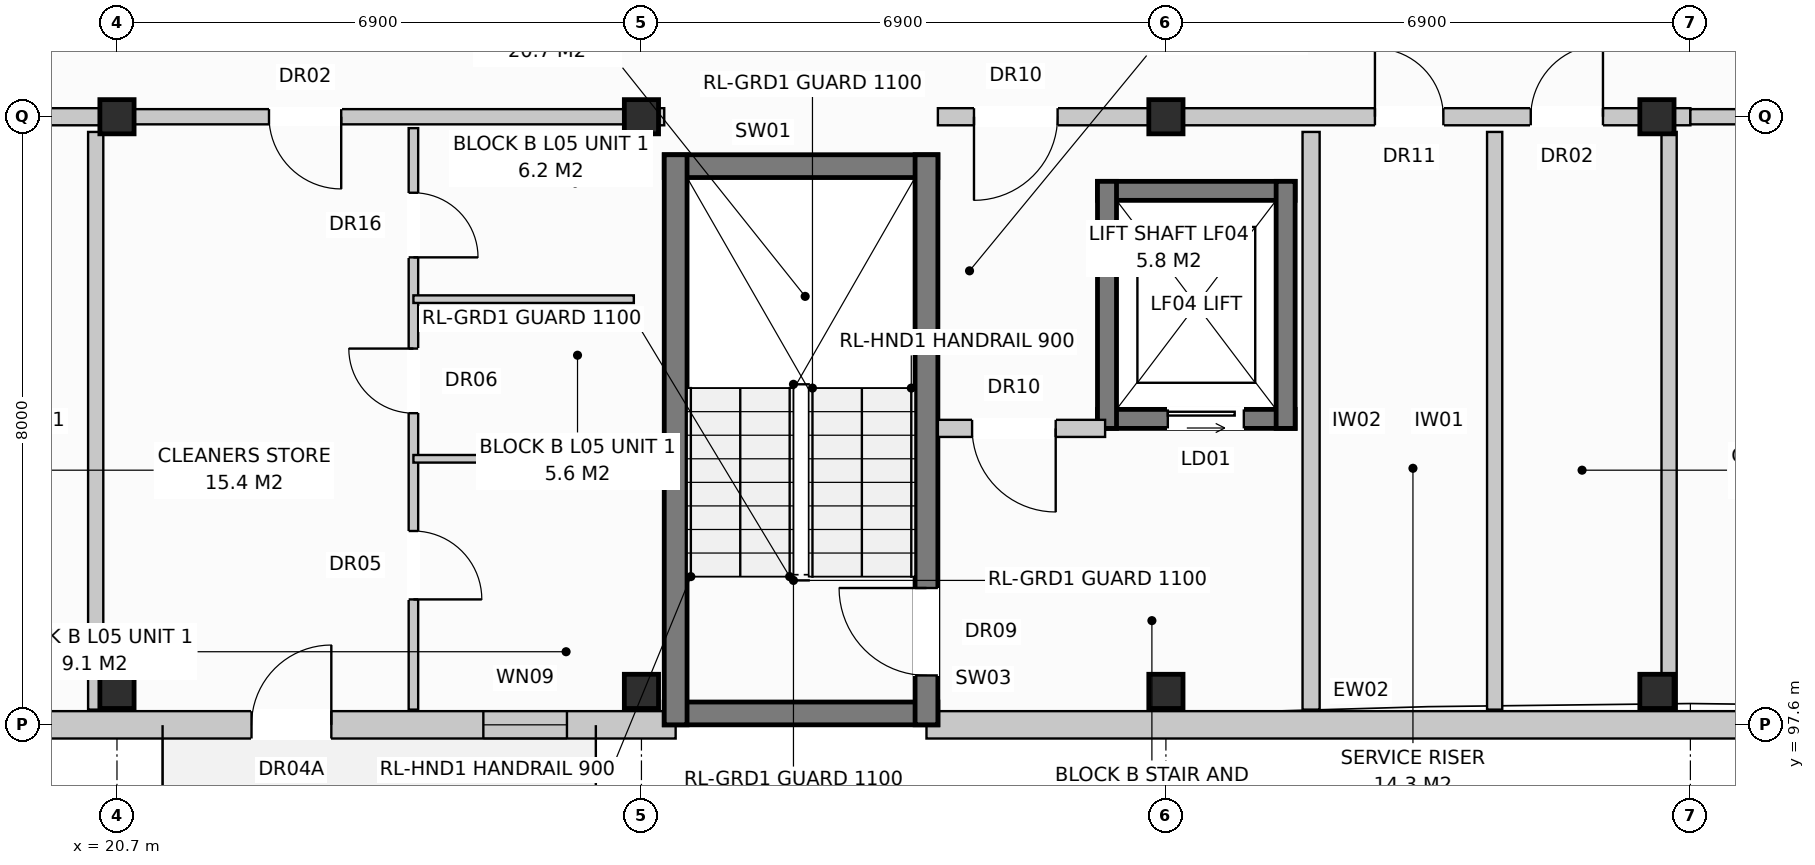
"""IFC4 building model, lengths in metres.
Left out: names, types, materials, properties, quantities, classifications, styles, units other than length and angle.
Written with IfcOpenShell. Run it as: python <this file> out.ifc"""

import sys

from ifc_helpers import new_model, si_unit, direction, frame, frame_2d, origin, origin_with_axes, origin_2d, place, context, subcontext, project, spatial, rectangle, extrude, element, fill, save


model = new_model("IFC4")
c1 = context("Model", 3, precision=1e-05, world=origin(), true_north=direction((0.0, 1.0)))
c2 = subcontext(c1, "Body", "Model", "MODEL_VIEW")
j1 = project(units=[si_unit("LENGTHUNIT", "METRE"), si_unit("PLANEANGLEUNIT", "RADIAN")], contexts=[c1])
p1 = place(None, origin())
s1 = spatial("IfcSite", under=j1, at=p1, CompositionType="ELEMENT")
p2 = place(p1, origin())
s2 = spatial("IfcBuilding", under=s1, at=p2, CompositionType="ELEMENT")
p3 = place(p2, frame((0.0, 0.0, 17.6)))
s3 = spatial("IfcBuildingStorey", under=s2, at=p3, CompositionType="ELEMENT", Elevation=17.6)
for number, where, z_axis, x_axis in (
    (1, (20.7, 98.04, 0.0), (0.0, 0.0, 1.0), (1.0, 0.0, 0.0)),
    (2, (20.7, 105.6, 0.0), (0.0, 0.0, 1.0), (1.0, 0.0, 0.0)),
    (3, (27.6, 98.04, 0.0), (0.0, 0.0, 1.0), (1.0, 0.0, 0.0)),
    (4, (27.6, 105.6, 0.0), (0.0, 0.0, 1.0), (1.0, 0.0, 0.0)),
    (5, (34.5, 98.04, 0.0), (0.0, 0.0, 1.0), (1.0, 0.0, 0.0)),
    (6, (34.5, 105.6, 0.0), (0.0, 0.0, 1.0), (1.0, 0.0, 0.0)),
    (7, (40.96, 98.04, 0.0), (0.0, 0.0, 1.0), (1.0, 0.0, 0.0)),
    (8, (40.96, 105.6, 0.0), (0.0, 0.0, 1.0), (1.0, 0.0, 0.0)),
):
    element("IfcColumn", number, at=place(p3, frame(where, z_axis=z_axis, x_axis=x_axis)), inside=s3, PredefinedType="COLUMN", context=c2, shape_type="SweptSolid", body=[
        extrude(rectangle(XDim=0.45, YDim=0.45, at=origin_2d()), origin(), (0.0, 0.0, 1.0), 3.2),
    ])
p4 = place(p3, frame((10.65, 97.6, 0.0), z_axis=(0.0, 0.0, 1.0), x_axis=(1.0, 0.0, 0.0)))
e9 = element("IfcWall", 9, at=p4, inside=s3, PredefinedType="STANDARD", context=c2, shape_type="SweptSolid", body=[
    extrude(rectangle(XDim=17.4, YDim=0.36, at=frame_2d((8.7, 0.0))), origin(), (0.0, 0.0, 1.0), 2.95),
])
p5 = place(p4, frame((11.82, 0.0, 0.0)))
e10 = element("IfcOpeningElement", 10, at=p5, cuts=e9, PredefinedType="OPENING", context=c2, shape_type="SweptSolid", body=[
    extrude(rectangle(XDim=1.05, YDim=2.12, at=frame_2d((0.525, 1.06))), frame((0.0, 0.192, 0.0), z_axis=(0.0, -1.0, 0.0), x_axis=(1.0, 0.0, 0.0)), (0.0, 0.0, 1.0), 0.384),
])
p6 = place(p4, frame((14.87, 0.0, 0.72)))
e11 = element("IfcOpeningElement", 11, at=p6, cuts=e9, PredefinedType="OPENING", context=c2, shape_type="SweptSolid", body=[
    extrude(rectangle(XDim=1.1, YDim=1.5, at=frame_2d((0.55, 0.75))), frame((0.0, 0.192, 0.0), z_axis=(0.0, -1.0, 0.0), x_axis=(1.0, 0.0, 0.0)), (0.0, 0.0, 1.0), 0.384),
])
p7 = place(p3, frame((31.35, 97.6, 0.0), z_axis=(0.0, 0.0, 1.0), x_axis=(1.0, 0.0, 0.0)))
e12 = element("IfcWall", 12, at=p7, inside=s3, PredefinedType="STANDARD", context=c2, shape_type="SweptSolid", body=[
    extrude(rectangle(XDim=23.68, YDim=0.36, at=frame_2d((11.84, 0.0))), origin(), (0.0, 0.0, 1.0), 2.95),
])
p8 = place(p7, frame((13.986, 0.0, 0.0)))
e13 = element("IfcOpeningElement", 13, at=p8, cuts=e12, PredefinedType="OPENING", context=c2, shape_type="SweptSolid", body=[
    extrude(rectangle(XDim=1.05, YDim=2.12, at=frame_2d((0.525, 1.06))), frame((0.0, 0.192, 0.0), z_axis=(0.0, -1.0, 0.0), x_axis=(1.0, 0.0, 0.0)), (0.0, 0.0, 1.0), 0.384),
])
p9 = place(p7, frame((11.745, 0.0, 0.8)))
e14 = element("IfcOpeningElement", 14, at=p9, cuts=e12, PredefinedType="OPENING", context=c2, shape_type="SweptSolid", body=[
    extrude(rectangle(XDim=1.95, YDim=1.65, at=frame_2d((0.975, 0.825))), frame((0.0, 0.192, 0.0), z_axis=(0.0, -1.0, 0.0), x_axis=(1.0, 0.0, 0.0)), (0.0, 0.0, 1.0), 0.384),
])
p10 = place(p7, frame((17.87, 0.0, 0.72)))
e15 = element("IfcOpeningElement", 15, at=p10, cuts=e12, PredefinedType="OPENING", context=c2, shape_type="SweptSolid", body=[
    extrude(rectangle(XDim=1.1, YDim=1.5, at=frame_2d((0.55, 0.75))), frame((0.0, 0.192, 0.0), z_axis=(0.0, -1.0, 0.0), x_axis=(1.0, 0.0, 0.0)), (0.0, 0.0, 1.0), 0.384),
])
p11 = place(p7, frame((20.67, 0.0, 0.8)))
e16 = element("IfcOpeningElement", 16, at=p11, cuts=e12, PredefinedType="OPENING", context=c2, shape_type="SweptSolid", body=[
    extrude(rectangle(XDim=1.9, YDim=1.85, at=frame_2d((0.95, 0.925))), frame((0.0, 0.192, 0.0), z_axis=(0.0, -1.0, 0.0), x_axis=(1.0, 0.0, 0.0)), (0.0, 0.0, 1.0), 0.384),
])
p12 = place(p3, frame((20.42, 97.8, 0.0), z_axis=(0.0, 0.0, 1.0), x_axis=(0.0, 1.0, 0.0)))
e17 = element("IfcWall", 17, at=p12, inside=s3, PredefinedType="PARTITIONING", context=c2, shape_type="SweptSolid", body=[
    extrude(rectangle(XDim=7.6, YDim=0.2, at=frame_2d((3.8, 0.0))), origin(), (0.0, 0.0, 1.0), 2.95),
])
p13 = place(p3, frame((10.8, 105.6, 0.0), z_axis=(0.0, 0.0, 1.0), x_axis=(1.0, 0.0, 0.0)))
e18 = element("IfcWall", 18, at=p13, inside=s3, PredefinedType="PARTITIONING", context=c2, shape_type="SweptSolid", body=[
    extrude(rectangle(XDim=9.9, YDim=0.225, at=frame_2d((4.95, 0.0))), origin(), (0.0, 0.0, 1.0), 2.39),
])
p14 = place(p13, frame((0.475, 0.0, 0.0)))
e19 = element("IfcOpeningElement", 19, at=p14, cuts=e18, PredefinedType="OPENING", context=c2, shape_type="SweptSolid", body=[
    extrude(rectangle(XDim=1.1, YDim=2.15, at=frame_2d((0.55, 1.075))), frame((0.0, 0.125, 0.0), z_axis=(0.0, -1.0, 0.0), x_axis=(1.0, 0.0, 0.0)), (0.0, 0.0, 1.0), 0.249),
])
p15 = place(p13, frame((5.75, 0.0, 0.0)))
e20 = element("IfcOpeningElement", 20, at=p15, cuts=e18, PredefinedType="OPENING", context=c2, shape_type="SweptSolid", body=[
    extrude(rectangle(XDim=0.9, YDim=2.1, at=frame_2d((0.45, 1.05))), frame((0.0, 0.125, 0.0), z_axis=(0.0, -1.0, 0.0), x_axis=(1.0, 0.0, 0.0)), (0.0, 0.0, 1.0), 0.249),
])
p16 = place(p13, frame((7.8, 0.0, 0.0)))
e21 = element("IfcOpeningElement", 21, at=p16, cuts=e18, PredefinedType="OPENING", context=c2, shape_type="SweptSolid", body=[
    extrude(rectangle(XDim=0.95, YDim=2.15, at=frame_2d((0.475, 1.075))), frame((0.0, 0.125, 0.0), z_axis=(0.0, -1.0, 0.0), x_axis=(1.0, 0.0, 0.0)), (0.0, 0.0, 1.0), 0.249),
])
for number, where, z_axis, x_axis in (
    (22, (27.9, 97.75, 0.0), (0.0, 0.0, 1.0), (1.0, 0.0, 0.0)),
    (23, (27.9, 104.95, 0.0), (0.0, 0.0, 1.0), (1.0, 0.0, 0.0)),
):
    element("IfcWall", number, at=place(p3, frame(where, z_axis=z_axis, x_axis=x_axis)), inside=s3, PredefinedType="SHEAR", context=c2, shape_type="SweptSolid", body=[
        extrude(rectangle(XDim=3.6, YDim=0.3, at=frame_2d((1.8, 0.0))), origin(), (0.0, 0.0, 1.0), 2.95),
    ])
p17 = place(p3, frame((28.05, 97.6, 0.0), z_axis=(0.0, 0.0, 1.0), x_axis=(0.0, 1.0, 0.0)))
e24 = element("IfcWall", 24, at=p17, inside=s3, PredefinedType="SHEAR", context=c2, shape_type="SweptSolid", body=[
    extrude(rectangle(XDim=7.5, YDim=0.3, at=frame_2d((3.75, 0.0))), origin(), (0.0, 0.0, 1.0), 2.95),
])
p18 = place(p3, frame((31.35, 97.6, 0.0), z_axis=(0.0, 0.0, 1.0), x_axis=(0.0, 1.0, 0.0)))
e25 = element("IfcWall", 25, at=p18, inside=s3, PredefinedType="SHEAR", context=c2, shape_type="SweptSolid", body=[
    extrude(rectangle(XDim=7.5, YDim=0.3, at=frame_2d((3.75, 0.0))), origin(), (0.0, 0.0, 1.0), 2.95),
])
p19 = place(p18, frame((0.65, 0.0, 0.0)))
e26 = element("IfcOpeningElement", 26, at=p19, cuts=e25, PredefinedType="OPENING", context=c2, shape_type="SweptSolid", body=[
    extrude(rectangle(XDim=1.15, YDim=2.15, at=frame_2d((0.575, 1.075))), frame((0.0, 0.162, 0.0), z_axis=(0.0, -1.0, 0.0), x_axis=(1.0, 0.0, 0.0)), (0.0, 0.0, 1.0), 0.324),
])
p20 = place(p3, frame((33.6, 101.625, 0.0), z_axis=(0.0, 0.0, 1.0), x_axis=(1.0, 0.0, 0.0)))
e27 = element("IfcWall", 27, at=p20, inside=s3, PredefinedType="SHEAR", context=c2, shape_type="SweptSolid", body=[
    extrude(rectangle(XDim=2.6, YDim=0.25, at=frame_2d((1.3, 0.0))), origin(), (0.0, 0.0, 1.0), 2.95),
])
p21 = place(p20, frame((0.925, 0.0, 0.0)))
e28 = element("IfcOpeningElement", 28, at=p21, cuts=e27, PredefinedType="OPENING", context=c2, shape_type="SweptSolid", body=[
    extrude(rectangle(XDim=1.0, YDim=2.1, at=frame_2d((0.5, 1.05))), frame((0.0, 0.137, 0.0), z_axis=(0.0, -1.0, 0.0), x_axis=(1.0, 0.0, 0.0)), (0.0, 0.0, 1.0), 0.274),
])
p22 = place(p3, frame((33.6, 104.625, 0.0), z_axis=(0.0, 0.0, 1.0), x_axis=(1.0, 0.0, 0.0)))
e29 = element("IfcWall", 29, at=p22, inside=s3, PredefinedType="SHEAR", context=c2, shape_type="SweptSolid", body=[
    extrude(rectangle(XDim=2.6, YDim=0.25, at=frame_2d((1.3, 0.0))), origin(), (0.0, 0.0, 1.0), 2.95),
])
for number, where, z_axis, x_axis in (
    (30, (33.725, 101.5, 0.0), (0.0, 0.0, 1.0), (0.0, 1.0, 0.0)),
    (31, (36.075, 101.5, 0.0), (0.0, 0.0, 1.0), (0.0, 1.0, 0.0)),
):
    element("IfcWall", number, at=place(p3, frame(where, z_axis=z_axis, x_axis=x_axis)), inside=s3, PredefinedType="SHEAR", context=c2, shape_type="SweptSolid", body=[
        extrude(rectangle(XDim=3.25, YDim=0.25, at=frame_2d((1.625, 0.0))), origin(), (0.0, 0.0, 1.0), 2.95),
    ])
p23 = place(p3, frame((36.41, 97.8, 0.0), z_axis=(0.0, 0.0, 1.0), x_axis=(0.0, 1.0, 0.0)))
e32 = element("IfcWall", 32, at=p23, inside=s3, PredefinedType="PARTITIONING", context=c2, shape_type="SweptSolid", body=[
    extrude(rectangle(XDim=7.6, YDim=0.225, at=frame_2d((3.8, 0.0))), origin(), (0.0, 0.0, 1.0), 2.59),
])
p24 = place(p3, frame((31.5, 101.5, 0.0), z_axis=(0.0, 0.0, 1.0), x_axis=(1.0, 0.0, 0.0)))
e33 = element("IfcWall", 33, at=p24, inside=s3, PredefinedType="PARTITIONING", context=c2, shape_type="SweptSolid", body=[
    extrude(rectangle(XDim=2.2, YDim=0.225, at=frame_2d((1.1, 0.0))), origin(), (0.0, 0.0, 1.0), 2.95),
])
p25 = place(p24, frame((0.45, 0.0, 0.0)))
e34 = element("IfcOpeningElement", 34, at=p25, cuts=e33, PredefinedType="OPENING", context=c2, shape_type="SweptSolid", body=[
    extrude(rectangle(XDim=1.1, YDim=2.15, at=frame_2d((0.55, 1.075))), frame((0.0, 0.125, 0.0), z_axis=(0.0, -1.0, 0.0), x_axis=(1.0, 0.0, 0.0)), (0.0, 0.0, 1.0), 0.249),
])
p26 = place(p3, frame((27.6, 105.6, 0.0), z_axis=(0.0, 0.0, 1.0), x_axis=(1.0, 0.0, 0.0)))
e35 = element("IfcWall", 35, at=p26, inside=s3, PredefinedType="PARTITIONING", context=c2, shape_type="SweptSolid", body=[
    extrude(rectangle(XDim=0.3, YDim=0.225, at=frame_2d((0.15, 0.0))), origin(), (0.0, 0.0, 1.0), 2.95),
])
for number, where, z_axis, x_axis in (
    (36, (38.825, 97.8, 0.0), (0.0, 0.0, 1.0), (0.0, 1.0, 0.0)),
    (37, (41.12, 97.8, 0.0), (0.0, 0.0, 1.0), (0.0, 1.0, 0.0)),
):
    element("IfcWall", number, at=place(p3, frame(where, z_axis=z_axis, x_axis=x_axis)), inside=s3, PredefinedType="PARTITIONING", context=c2, shape_type="SweptSolid", body=[
        extrude(rectangle(XDim=7.6, YDim=0.2, at=frame_2d((3.8, 0.0))), origin(), (0.0, 0.0, 1.0), 2.95),
    ])
p27 = place(p3, frame((31.5, 105.6, 0.0), z_axis=(0.0, 0.0, 1.0), x_axis=(1.0, 0.0, 0.0)))
e38 = element("IfcWall", 38, at=p27, inside=s3, PredefinedType="PARTITIONING", context=c2, shape_type="SweptSolid", body=[
    extrude(rectangle(XDim=9.9, YDim=0.225, at=frame_2d((4.95, 0.0))), origin(), (0.0, 0.0, 1.0), 2.39),
])
p28 = place(p27, frame((0.475, 0.0, 0.0)))
e39 = element("IfcOpeningElement", 39, at=p28, cuts=e38, PredefinedType="OPENING", context=c2, shape_type="SweptSolid", body=[
    extrude(rectangle(XDim=1.1, YDim=2.15, at=frame_2d((0.55, 1.075))), frame((0.0, 0.125, 0.0), z_axis=(0.0, -1.0, 0.0), x_axis=(1.0, 0.0, 0.0)), (0.0, 0.0, 1.0), 0.249),
])
p29 = place(p27, frame((5.75, 0.0, 0.0)))
e40 = element("IfcOpeningElement", 40, at=p29, cuts=e38, PredefinedType="OPENING", context=c2, shape_type="SweptSolid", body=[
    extrude(rectangle(XDim=0.9, YDim=2.1, at=frame_2d((0.45, 1.05))), frame((0.0, 0.125, 0.0), z_axis=(0.0, -1.0, 0.0), x_axis=(1.0, 0.0, 0.0)), (0.0, 0.0, 1.0), 0.249),
])
p30 = place(p27, frame((7.8, 0.0, 0.0)))
e41 = element("IfcOpeningElement", 41, at=p30, cuts=e38, PredefinedType="OPENING", context=c2, shape_type="SweptSolid", body=[
    extrude(rectangle(XDim=0.95, YDim=2.15, at=frame_2d((0.475, 1.075))), frame((0.0, 0.125, 0.0), z_axis=(0.0, -1.0, 0.0), x_axis=(1.0, 0.0, 0.0)), (0.0, 0.0, 1.0), 0.249),
])
p31 = place(p3, frame((20.7, 105.6, 0.0), z_axis=(0.0, 0.0, 1.0), x_axis=(1.0, 0.0, 0.0)))
e42 = element("IfcWall", 42, at=p31, inside=s3, PredefinedType="PARTITIONING", context=c2, shape_type="SweptSolid", body=[
    extrude(rectangle(XDim=6.9, YDim=0.2, at=frame_2d((3.45, 0.0))), origin(), (0.0, 0.0, 1.0), 2.39),
])
p32 = place(p31, frame((2.0, 0.0, 0.0)))
e43 = element("IfcOpeningElement", 43, at=p32, cuts=e42, PredefinedType="OPENING", context=c2, shape_type="SweptSolid", body=[
    extrude(rectangle(XDim=0.95, YDim=2.15, at=frame_2d((0.475, 1.075))), frame((0.0, 0.112, 0.0), z_axis=(0.0, -1.0, 0.0), x_axis=(1.0, 0.0, 0.0)), (0.0, 0.0, 1.0), 0.224),
])
p33 = place(p3, frame((24.6, 105.45, 0.0), z_axis=(0.0, 0.0, 1.0), x_axis=(0.0, -1.0, 0.0)))
e44 = element("IfcWall", 44, at=p33, inside=s3, PredefinedType="PARTITIONING", context=c2, shape_type="SweptSolid", body=[
    extrude(rectangle(XDim=7.65, YDim=0.125, at=frame_2d((3.825, 0.0))), origin(), (0.0, 0.0, 1.0), 2.95),
])
p34 = place(p33, frame((0.85, 0.0, 0.0)))
e45 = element("IfcOpeningElement", 45, at=p34, cuts=e44, PredefinedType="OPENING", context=c2, shape_type="SweptSolid", body=[
    extrude(rectangle(XDim=0.85, YDim=2.1, at=frame_2d((0.425, 1.05))), frame((0.0, 0.074, 0.0), z_axis=(0.0, -1.0, 0.0), x_axis=(1.0, 0.0, 0.0)), (0.0, 0.0, 1.0), 0.149),
])
p35 = place(p33, frame((2.9, 0.0, 0.0)))
e46 = element("IfcOpeningElement", 46, at=p35, cuts=e44, PredefinedType="OPENING", context=c2, shape_type="SweptSolid", body=[
    extrude(rectangle(XDim=0.85, YDim=2.05, at=frame_2d((0.425, 1.025))), frame((0.0, 0.074, 0.0), z_axis=(0.0, -1.0, 0.0), x_axis=(1.0, 0.0, 0.0)), (0.0, 0.0, 1.0), 0.149),
])
p36 = place(p33, frame((5.3, 0.0, 0.0)))
e47 = element("IfcOpeningElement", 47, at=p36, cuts=e44, PredefinedType="OPENING", context=c2, shape_type="SweptSolid", body=[
    extrude(rectangle(XDim=0.9, YDim=2.1, at=frame_2d((0.45, 1.05))), frame((0.0, 0.074, 0.0), z_axis=(0.0, -1.0, 0.0), x_axis=(1.0, 0.0, 0.0)), (0.0, 0.0, 1.0), 0.149),
])
for number, where, z_axis, x_axis in (
    (48, (24.6, 103.2, 0.0), (0.0, 0.0, 1.0), (1.0, 0.0, 0.0)),
    (49, (24.6, 101.1, 0.0), (0.0, 0.0, 1.0), (1.0, 0.0, 0.0)),
):
    element("IfcWall", number, at=place(p3, frame(where, z_axis=z_axis, x_axis=x_axis)), inside=s3, PredefinedType="PARTITIONING", context=c2, shape_type="SweptSolid", body=[
        extrude(rectangle(XDim=2.9, YDim=0.1, at=frame_2d((1.45, 0.0))), origin(), (0.0, 0.0, 1.0), 2.95),
    ])
p37 = place(p3, frame((41.4, 105.6, 0.0), z_axis=(0.0, 0.0, 1.0), x_axis=(1.0, 0.0, 0.0)))
e50 = element("IfcWall", 50, at=p37, inside=s3, PredefinedType="PARTITIONING", context=c2, shape_type="SweptSolid", body=[
    extrude(rectangle(XDim=13.8, YDim=0.2, at=frame_2d((6.9, 0.0))), origin(), (0.0, 0.0, 1.0), 2.39),
])
p38 = place(p37, frame((2.4, 0.0, 0.0)))
e51 = element("IfcOpeningElement", 51, at=p38, cuts=e50, PredefinedType="OPENING", context=c2, shape_type="SweptSolid", body=[
    extrude(rectangle(XDim=0.95, YDim=2.15, at=frame_2d((0.475, 1.075))), frame((0.0, 0.112, 0.0), z_axis=(0.0, -1.0, 0.0), x_axis=(1.0, 0.0, 0.0)), (0.0, 0.0, 1.0), 0.224),
])
p39 = place(p5, origin_with_axes())
e52 = element("IfcDoor", 52, at=p39, inside=s3, OperationType="SINGLE_SWING_RIGHT", PredefinedType="DOOR", context=c2, shape_type="SweptSolid", body=[
    extrude(rectangle(XDim=1.05, YDim=2.12, at=frame_2d((0.525, 1.06))), frame((0.0, 0.025, 0.0), z_axis=(0.0, -1.0, 0.0), x_axis=(1.0, 0.0, 0.0)), (0.0, 0.0, 1.0), 0.05),
])
fill(e10, e52)
p40 = place(p6, origin_with_axes())
e53 = element("IfcWindow", 53, at=p40, inside=s3, PartitioningType="SINGLE_PANEL", PredefinedType="WINDOW", context=c2, shape_type="SweptSolid", body=[
    extrude(rectangle(XDim=1.1, YDim=1.5, at=frame_2d((0.55, 0.75))), frame((0.0, 0.03, 0.0), z_axis=(0.0, -1.0, 0.0), x_axis=(1.0, 0.0, 0.0)), (0.0, 0.0, 1.0), 0.06),
])
fill(e11, e53)
p41 = place(p19, origin_with_axes())
e54 = element("IfcDoor", 54, at=p41, inside=s3, OperationType="SINGLE_SWING_RIGHT", PredefinedType="DOOR", context=c2, shape_type="SweptSolid", body=[
    extrude(rectangle(XDim=1.15, YDim=2.15, at=frame_2d((0.575, 1.075))), frame((0.0, 0.025, 0.0), z_axis=(0.0, -1.0, 0.0), x_axis=(1.0, 0.0, 0.0)), (0.0, 0.0, 1.0), 0.05),
])
fill(e26, e54)
p42 = place(p21, origin_with_axes())
e55 = element("IfcDoor", 55, at=p42, inside=s3, OperationType="SLIDING_TO_LEFT", PredefinedType="DOOR", context=c2, shape_type="SweptSolid", body=[
    extrude(rectangle(XDim=1.0, YDim=2.1, at=frame_2d((0.5, 1.05))), frame((0.0, 0.025, 0.0), z_axis=(0.0, -1.0, 0.0), x_axis=(1.0, 0.0, 0.0)), (0.0, 0.0, 1.0), 0.05),
])
fill(e28, e55)
p43 = place(p25, frame((1.1, 0.0, 0.0), z_axis=(0.0, 0.0, 1.0), x_axis=(-1.0, 0.0, 0.0)))
e56 = element("IfcDoor", 56, at=p43, inside=s3, OperationType="SINGLE_SWING_RIGHT", PredefinedType="DOOR", context=c2, shape_type="SweptSolid", body=[
    extrude(rectangle(XDim=1.1, YDim=2.15, at=frame_2d((0.55, 1.075))), frame((0.0, 0.025, 0.0), z_axis=(0.0, -1.0, 0.0), x_axis=(1.0, 0.0, 0.0)), (0.0, 0.0, 1.0), 0.05),
])
fill(e34, e56)
p44 = place(p28, frame((1.1, 0.0, 0.0), z_axis=(0.0, 0.0, 1.0), x_axis=(-1.0, 0.0, 0.0)))
e57 = element("IfcDoor", 57, at=p44, inside=s3, OperationType="SINGLE_SWING_LEFT", PredefinedType="DOOR", context=c2, shape_type="SweptSolid", body=[
    extrude(rectangle(XDim=1.1, YDim=2.15, at=frame_2d((0.55, 1.075))), frame((0.0, 0.025, 0.0), z_axis=(0.0, -1.0, 0.0), x_axis=(1.0, 0.0, 0.0)), (0.0, 0.0, 1.0), 0.05),
])
fill(e39, e57)
p45 = place(p29, origin_with_axes())
e58 = element("IfcDoor", 58, at=p45, inside=s3, OperationType="SINGLE_SWING_LEFT", PredefinedType="DOOR", context=c2, shape_type="SweptSolid", body=[
    extrude(rectangle(XDim=0.9, YDim=2.1, at=frame_2d((0.45, 1.05))), frame((0.0, 0.025, 0.0), z_axis=(0.0, -1.0, 0.0), x_axis=(1.0, 0.0, 0.0)), (0.0, 0.0, 1.0), 0.05),
])
fill(e40, e58)
p46 = place(p30, origin_with_axes())
e59 = element("IfcDoor", 59, at=p46, inside=s3, OperationType="SINGLE_SWING_RIGHT", PredefinedType="DOOR", context=c2, shape_type="SweptSolid", body=[
    extrude(rectangle(XDim=0.95, YDim=2.15, at=frame_2d((0.475, 1.075))), frame((0.0, 0.025, 0.0), z_axis=(0.0, -1.0, 0.0), x_axis=(1.0, 0.0, 0.0)), (0.0, 0.0, 1.0), 0.05),
])
fill(e41, e59)
p47 = place(p32, frame((0.95, 0.0, 0.0), z_axis=(0.0, 0.0, 1.0), x_axis=(-1.0, 0.0, 0.0)))
e60 = element("IfcDoor", 60, at=p47, inside=s3, OperationType="SINGLE_SWING_RIGHT", PredefinedType="DOOR", context=c2, shape_type="SweptSolid", body=[
    extrude(rectangle(XDim=0.95, YDim=2.15, at=frame_2d((0.475, 1.075))), frame((0.0, 0.025, 0.0), z_axis=(0.0, -1.0, 0.0), x_axis=(1.0, 0.0, 0.0)), (0.0, 0.0, 1.0), 0.05),
])
fill(e43, e60)
p48 = place(p34, origin_with_axes())
e61 = element("IfcDoor", 61, at=p48, inside=s3, OperationType="SINGLE_SWING_RIGHT", PredefinedType="DOOR", context=c2, shape_type="SweptSolid", body=[
    extrude(rectangle(XDim=0.85, YDim=2.1, at=frame_2d((0.425, 1.05))), frame((0.0, 0.025, 0.0), z_axis=(0.0, -1.0, 0.0), x_axis=(1.0, 0.0, 0.0)), (0.0, 0.0, 1.0), 0.05),
])
fill(e45, e61)
p49 = place(p35, frame((0.85, 0.0, 0.0), z_axis=(0.0, 0.0, 1.0), x_axis=(-1.0, 0.0, 0.0)))
e62 = element("IfcDoor", 62, at=p49, inside=s3, OperationType="SINGLE_SWING_LEFT", PredefinedType="DOOR", context=c2, shape_type="SweptSolid", body=[
    extrude(rectangle(XDim=0.85, YDim=2.05, at=frame_2d((0.425, 1.025))), frame((0.0, 0.025, 0.0), z_axis=(0.0, -1.0, 0.0), x_axis=(1.0, 0.0, 0.0)), (0.0, 0.0, 1.0), 0.05),
])
fill(e46, e62)
p50 = place(p36, origin_with_axes())
e63 = element("IfcDoor", 63, at=p50, inside=s3, OperationType="SINGLE_SWING_RIGHT", PredefinedType="DOOR", context=c2, shape_type="SweptSolid", body=[
    extrude(rectangle(XDim=0.9, YDim=2.1, at=frame_2d((0.45, 1.05))), frame((0.0, 0.025, 0.0), z_axis=(0.0, -1.0, 0.0), x_axis=(1.0, 0.0, 0.0)), (0.0, 0.0, 1.0), 0.05),
])
fill(e47, e63)
save(model, sys.argv[1])
